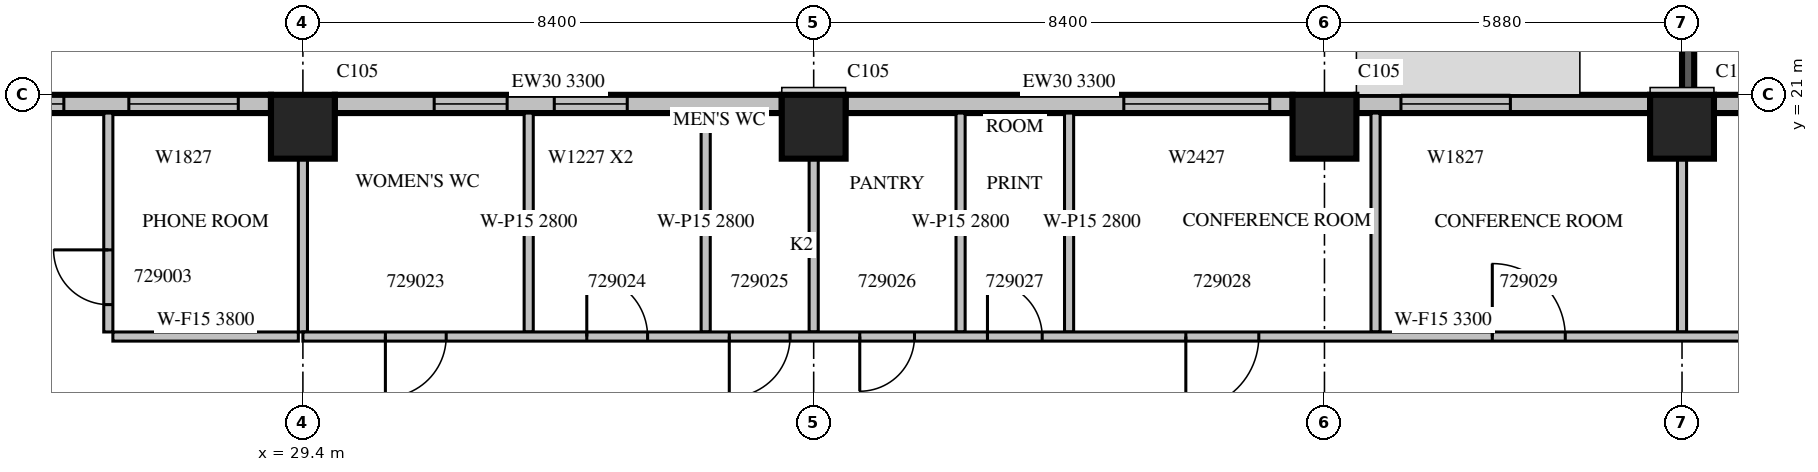
"""IFC4 building model, lengths in metres.
Left out: names, types, materials, properties, quantities, classifications, styles, units other than length and angle.
Written with IfcOpenShell. Run it as: python <this file> out.ifc"""

import sys

from ifc_helpers import new_model, si_unit, direction, frame, frame_2d, origin, origin_2d, place, context, subcontext, project, spatial, rectangle, extrude, source, transform, mapped, element, fill, save


model = new_model("IFC4")
c1 = context("Model", 3, precision=1e-05, world=origin(), true_north=direction((0.0, 1.0)))
c2 = subcontext(c1, "Body", "Model", "MODEL_VIEW")
j1 = project(units=[si_unit("LENGTHUNIT", "METRE"), si_unit("PLANEANGLEUNIT", "RADIAN")], contexts=[c1])
p1 = place(None, origin())
s1 = spatial("IfcSite", under=j1, at=p1, CompositionType="ELEMENT")
p2 = place(p1, origin())
s2 = spatial("IfcBuilding", under=s1, at=p2, CompositionType="ELEMENT")
p3 = place(p2, frame((0.0, 0.0, 132.9)))
s3 = spatial("IfcBuildingStorey", under=s2, at=p3, CompositionType="ELEMENT", Elevation=132.9)
m1 = source(origin(), c2, "Body", "SweptSolid", [
    extrude(rectangle(XDim=1.05, YDim=1.05, at=origin_2d()), origin(), (0.0, 0.0, 1.0), 4.2),
])
for number, where, z_axis, x_axis in (
    (1, (29.4, 20.475, 0.0), (0.0, 0.0, 1.0), (1.0, 0.0, 0.0)),
    (2, (37.8, 20.475, 0.0), (0.0, 0.0, 1.0), (1.0, 0.0, 0.0)),
    (3, (46.2, 20.475, 0.0), (0.0, 0.0, 1.0), (1.0, 0.0, 0.0)),
    (4, (52.08, 20.475, 0.0), (0.0, 0.0, 1.0), (1.0, 0.0, 0.0)),
):
    element("IfcColumn", number, at=place(p3, frame(where, z_axis=z_axis, x_axis=x_axis)), inside=s3, PredefinedType="COLUMN", context=c2, shape_type="MappedRepresentation", body=[
        mapped(m1, transform((0.0, 0.0, 0.0), scale=1.0)),
    ])
m2 = source(origin(), c2, "Body", "SweptSolid", [
    extrude(rectangle(XDim=3.9, YDim=0.2, at=frame_2d((1.95, 0.0))), origin(), (0.0, 0.0, 1.0), 3.79),
])
p4 = place(p3, frame((52.18, 21.0, 0.0), z_axis=(0.0, 0.0, 1.0), x_axis=(0.0, 1.0, 0.0)))
e5 = element("IfcWall", 5, at=p4, inside=s3, PredefinedType="SOLIDWALL", context=c2, shape_type="MappedRepresentation", body=[
    mapped(m2, transform((0.0, 0.0, 0.0), scale=1.0)),
])
m3 = source(origin(), c2, "Body", "SweptSolid", [
    extrude(rectangle(XDim=2.4, YDim=2.7, at=frame_2d((1.2, 1.35))), frame((0.0, 0.11, 0.0), z_axis=(0.0, -1.0, 0.0), x_axis=(1.0, 0.0, 0.0)), (0.0, 0.0, 1.0), 0.22),
])
p5 = place(p4, frame((0.75, 0.0, 0.6)))
e6 = element("IfcOpeningElement", 6, at=p5, cuts=e5, PredefinedType="OPENING", context=c2, shape_type="MappedRepresentation", body=[
    mapped(m3, transform((0.0, 0.0, 0.0), scale=1.0)),
])
m4 = source(origin(), c2, "Body", "SweptSolid", [
    extrude(rectangle(XDim=4.83, YDim=0.3, at=frame_2d((2.415, 0.0))), origin(), (0.0, 0.0, 1.0), 3.8),
])
p6 = place(p3, frame((57.435, 20.85, 0.0), z_axis=(0.0, 0.0, 1.0), x_axis=(-1.0, 0.0, 0.0)))
e7 = element("IfcWall", 7, at=p6, inside=s3, PredefinedType="STANDARD", context=c2, shape_type="MappedRepresentation", body=[
    mapped(m4, transform((0.0, 0.0, 0.0), scale=1.0)),
])
m5 = source(origin(), c2, "Body", "SweptSolid", [
    extrude(rectangle(XDim=1.0, YDim=2.1, at=frame_2d((0.5, 1.05))), frame((0.0, 0.16, 0.0), z_axis=(0.0, -1.0, 0.0), x_axis=(1.0, 0.0, 0.0)), (0.0, 0.0, 1.0), 0.32),
])
p7 = place(p6, frame((1.962, 0.0, 0.0)))
e8 = element("IfcOpeningElement", 8, at=p7, cuts=e7, PredefinedType="OPENING", context=c2, shape_type="MappedRepresentation", body=[
    mapped(m5, transform((0.0, 0.0, 0.0), scale=1.0)),
])
p8 = place(p3, frame((51.555, 20.85, 0.0), z_axis=(0.0, 0.0, 1.0), x_axis=(-1.0, 0.0, 0.0)))
e9 = element("IfcWall", 9, at=p8, inside=s3, PredefinedType="STANDARD", context=c2, shape_type="MappedRepresentation", body=[
    mapped(m4, transform((0.0, 0.0, 0.0), scale=1.0)),
])
m6 = source(origin(), c2, "Body", "SweptSolid", [
    extrude(rectangle(XDim=1.8, YDim=2.7, at=frame_2d((0.9, 1.35))), frame((0.0, 0.16, 0.0), z_axis=(0.0, -1.0, 0.0), x_axis=(1.0, 0.0, 0.0)), (0.0, 0.0, 1.0), 0.32),
])
p9 = place(p8, frame((2.297, 0.0, 0.6)))
e10 = element("IfcOpeningElement", 10, at=p9, cuts=e9, PredefinedType="OPENING", context=c2, shape_type="MappedRepresentation", body=[
    mapped(m6, transform((0.0, 0.0, 0.0), scale=1.0)),
])
m7 = source(origin(), c2, "Body", "SweptSolid", [
    extrude(rectangle(XDim=7.35, YDim=0.3, at=frame_2d((3.675, 0.0))), origin(), (0.0, 0.0, 1.0), 3.3),
])
p10 = place(p3, frame((45.675, 20.85, 0.0), z_axis=(0.0, 0.0, 1.0), x_axis=(-1.0, 0.0, 0.0)))
e11 = element("IfcWall", 11, at=p10, inside=s3, PredefinedType="STANDARD", context=c2, shape_type="MappedRepresentation", body=[
    mapped(m7, transform((0.0, 0.0, 0.0), scale=1.0)),
])
m8 = source(origin(), c2, "Body", "SweptSolid", [
    extrude(rectangle(XDim=2.4, YDim=2.7, at=frame_2d((1.2, 1.35))), frame((0.0, 0.16, 0.0), z_axis=(0.0, -1.0, 0.0), x_axis=(1.0, 0.0, 0.0)), (0.0, 0.0, 1.0), 0.32),
])
p11 = place(p10, frame((0.375, 0.0, 0.6)))
e12 = element("IfcOpeningElement", 12, at=p11, cuts=e11, PredefinedType="OPENING", context=c2, shape_type="MappedRepresentation", body=[
    mapped(m8, transform((0.0, 0.0, 0.0), scale=1.0)),
])
p12 = place(p3, frame((37.275, 20.85, 0.0), z_axis=(0.0, 0.0, 1.0), x_axis=(-1.0, 0.0, 0.0)))
e13 = element("IfcWall", 13, at=p12, inside=s3, PredefinedType="STANDARD", context=c2, shape_type="MappedRepresentation", body=[
    mapped(m7, transform((0.0, 0.0, 0.0), scale=1.0)),
])
m9 = source(origin(), c2, "Body", "SweptSolid", [
    extrude(rectangle(XDim=1.2, YDim=2.7, at=frame_2d((0.6, 1.35))), frame((0.0, 0.16, 0.0), z_axis=(0.0, -1.0, 0.0), x_axis=(1.0, 0.0, 0.0)), (0.0, 0.0, 1.0), 0.32),
])
p13 = place(p12, frame((2.541, 0.0, 0.6)))
e14 = element("IfcOpeningElement", 14, at=p13, cuts=e13, PredefinedType="OPENING", context=c2, shape_type="MappedRepresentation", body=[
    mapped(m9, transform((0.0, 0.0, 0.0), scale=1.0)),
])
p14 = place(p12, frame((4.516, 0.0, 0.6)))
e15 = element("IfcOpeningElement", 15, at=p14, cuts=e13, PredefinedType="OPENING", context=c2, shape_type="MappedRepresentation", body=[
    mapped(m9, transform((0.0, 0.0, 0.0), scale=1.0)),
])
m10 = source(origin(), c2, "Body", "SweptSolid", [
    extrude(rectangle(XDim=6.875, YDim=0.3, at=frame_2d((3.438, 0.0))), origin(), (0.0, 0.0, 1.0), 3.8),
])
p15 = place(p3, frame((28.875, 20.85, 0.0), z_axis=(0.0, 0.0, 1.0), x_axis=(-1.0, 0.0, 0.0)))
e16 = element("IfcWall", 16, at=p15, inside=s3, PredefinedType="STANDARD", context=c2, shape_type="MappedRepresentation", body=[
    mapped(m10, transform((0.0, 0.0, 0.0), scale=1.0)),
])
p16 = place(p15, frame((0.537, 0.0, 0.6)))
e17 = element("IfcOpeningElement", 17, at=p16, cuts=e16, PredefinedType="OPENING", context=c2, shape_type="MappedRepresentation", body=[
    mapped(m6, transform((0.0, 0.0, 0.0), scale=1.0)),
])
p17 = place(p15, frame((3.406, 0.0, 0.6)))
e18 = element("IfcOpeningElement", 18, at=p17, cuts=e16, PredefinedType="OPENING", context=c2, shape_type="MappedRepresentation", body=[
    mapped(m8, transform((0.0, 0.0, 0.0), scale=1.0)),
])
m11 = source(origin(), c2, "Body", "SweptSolid", [
    extrude(rectangle(XDim=3.6, YDim=0.15, at=frame_2d((1.8, 0.0))), origin(), (0.0, 0.0, 1.0), 3.8),
])
p18 = place(p3, frame((26.2, 20.7, 0.0), z_axis=(0.0, 0.0, 1.0), x_axis=(0.0, -1.0, 0.0)))
e19 = element("IfcWall", 19, at=p18, inside=s3, PredefinedType="PARTITIONING", context=c2, shape_type="MappedRepresentation", body=[
    mapped(m11, transform((0.0, 0.0, 0.0), scale=1.0)),
])
m12 = source(origin(), c2, "Body", "SweptSolid", [
    extrude(rectangle(XDim=0.9, YDim=2.1, at=frame_2d((0.45, 1.05))), frame((0.0, 0.085, 0.0), z_axis=(0.0, -1.0, 0.0), x_axis=(1.0, 0.0, 0.0)), (0.0, 0.0, 1.0), 0.17),
])
p19 = place(p18, frame((2.25, 0.0, 0.0)))
e20 = element("IfcOpeningElement", 20, at=p19, cuts=e19, PredefinedType="OPENING", context=c2, shape_type="MappedRepresentation", body=[
    mapped(m12, transform((0.0, 0.0, 0.0), scale=1.0)),
])
m13 = source(origin(), c2, "Body", "SweptSolid", [
    extrude(rectangle(XDim=3.05, YDim=0.15, at=frame_2d((1.525, 0.0))), origin(), (0.0, 0.0, 1.0), 3.8),
])
p20 = place(p3, frame((26.275, 17.025, 0.0), z_axis=(0.0, 0.0, 1.0), x_axis=(1.0, 0.0, 0.0)))
e21 = element("IfcWall", 21, at=p20, inside=s3, PredefinedType="PARTITIONING", context=c2, shape_type="MappedRepresentation", body=[
    mapped(m13, transform((0.0, 0.0, 0.0), scale=1.0)),
])
m14 = source(origin(), c2, "Body", "SweptSolid", [
    extrude(rectangle(XDim=2.851, YDim=0.15, at=frame_2d((1.425, 0.0))), origin(), (0.0, 0.0, 1.0), 3.8),
])
p21 = place(p3, frame((29.4, 17.1, 0.0), z_axis=(0.0, 0.0, 1.0), x_axis=(0.0, 1.0, 0.0)))
e22 = element("IfcWall", 22, at=p21, inside=s3, PredefinedType="PARTITIONING", context=c2, shape_type="MappedRepresentation", body=[
    mapped(m14, transform((0.0, 0.0, 0.0), scale=1.0)),
])
m15 = source(origin(), c2, "Body", "SweptSolid", [
    extrude(rectangle(XDim=3.6, YDim=0.15, at=frame_2d((1.8, 0.0))), origin(), (0.0, 0.0, 1.0), 2.8),
])
for number, where, z_axis, x_axis in (
    (23, (33.113, 20.7, 0.0), (0.0, 0.0, 1.0), (0.0, -1.0, 0.0)),
    (24, (36.024, 20.7, 0.0), (0.0, 0.0, 1.0), (0.0, -1.0, 0.0)),
    (25, (40.216, 20.7, 0.0), (0.0, 0.0, 1.0), (0.0, -1.0, 0.0)),
):
    element("IfcWall", number, at=place(p3, frame(where, z_axis=z_axis, x_axis=x_axis)), inside=s3, PredefinedType="PARTITIONING", context=c2, shape_type="MappedRepresentation", body=[
        mapped(m15, transform((0.0, 0.0, 0.0), scale=1.0)),
    ])
p22 = place(p3, frame((47.04, 20.7, 0.0), z_axis=(0.0, 0.0, 1.0), x_axis=(0.0, -1.0, 0.0)))
e26 = element("IfcWall", 26, at=p22, inside=s3, PredefinedType="PARTITIONING", context=c2, shape_type="MappedRepresentation", body=[
    mapped(m11, transform((0.0, 0.0, 0.0), scale=1.0)),
])
p23 = place(p3, frame((37.8, 17.1, 0.0), z_axis=(0.0, 0.0, 1.0), x_axis=(0.0, 1.0, 0.0)))
e27 = element("IfcWall", 27, at=p23, inside=s3, PredefinedType="PARTITIONING", context=c2, shape_type="MappedRepresentation", body=[
    mapped(m14, transform((0.0, 0.0, 0.0), scale=1.0)),
])
p24 = place(p3, frame((42.0, 17.1, 0.0), z_axis=(0.0, 0.0, 1.0), x_axis=(0.0, 1.0, 0.0)))
e28 = element("IfcWall", 28, at=p24, inside=s3, PredefinedType="PARTITIONING", context=c2, shape_type="MappedRepresentation", body=[
    mapped(m15, transform((0.0, 0.0, 0.0), scale=1.0)),
])
p25 = place(p3, frame((52.08, 17.1, 0.0), z_axis=(0.0, 0.0, 1.0), x_axis=(0.0, 1.0, 0.0)))
e29 = element("IfcWall", 29, at=p25, inside=s3, PredefinedType="PARTITIONING", context=c2, shape_type="MappedRepresentation", body=[
    mapped(m14, transform((0.0, 0.0, 0.0), scale=1.0)),
])
m16 = source(origin(), c2, "Body", "SweptSolid", [
    extrude(rectangle(XDim=37.5, YDim=0.15, at=frame_2d((18.75, 0.0))), origin(), (0.0, 0.0, 1.0), 3.3),
])
p26 = place(p3, frame((29.4, 17.025, 0.0), z_axis=(0.0, 0.0, 1.0), x_axis=(1.0, 0.0, 0.0)))
e30 = element("IfcWall", 30, at=p26, inside=s3, PredefinedType="PARTITIONING", context=c2, shape_type="MappedRepresentation", body=[
    mapped(m16, transform((0.0, 0.0, 0.0), scale=1.0)),
])
m17 = source(origin(), c2, "Body", "SweptSolid", [
    extrude(rectangle(XDim=1.0, YDim=2.1, at=frame_2d((0.5, 1.05))), frame((0.0, 0.085, 0.0), z_axis=(0.0, -1.0, 0.0), x_axis=(1.0, 0.0, 0.0)), (0.0, 0.0, 1.0), 0.17),
])
p27 = place(p26, frame((1.357, 0.0, 0.0)))
e31 = element("IfcOpeningElement", 31, at=p27, cuts=e30, PredefinedType="OPENING", context=c2, shape_type="MappedRepresentation", body=[
    mapped(m17, transform((0.0, 0.0, 0.0), scale=1.0)),
])
p28 = place(p26, frame((4.669, 0.0, 0.0)))
e32 = element("IfcOpeningElement", 32, at=p28, cuts=e30, PredefinedType="OPENING", context=c2, shape_type="MappedRepresentation", body=[
    mapped(m17, transform((0.0, 0.0, 0.0), scale=1.0)),
])
p29 = place(p26, frame((7.012, 0.0, 0.0)))
e33 = element("IfcOpeningElement", 33, at=p29, cuts=e30, PredefinedType="OPENING", context=c2, shape_type="MappedRepresentation", body=[
    mapped(m17, transform((0.0, 0.0, 0.0), scale=1.0)),
])
p30 = place(p26, frame((9.158, 0.0, 0.0)))
e34 = element("IfcOpeningElement", 34, at=p30, cuts=e30, PredefinedType="OPENING", context=c2, shape_type="MappedRepresentation", body=[
    mapped(m12, transform((0.0, 0.0, 0.0), scale=1.0)),
])
p31 = place(p26, frame((11.258, 0.0, 0.0)))
e35 = element("IfcOpeningElement", 35, at=p31, cuts=e30, PredefinedType="OPENING", context=c2, shape_type="MappedRepresentation", body=[
    mapped(m12, transform((0.0, 0.0, 0.0), scale=1.0)),
])
m18 = source(origin(), c2, "Body", "SweptSolid", [
    extrude(rectangle(XDim=1.2, YDim=2.1, at=frame_2d((0.6, 1.05))), frame((0.0, 0.085, 0.0), z_axis=(0.0, -1.0, 0.0), x_axis=(1.0, 0.0, 0.0)), (0.0, 0.0, 1.0), 0.17),
])
p32 = place(p26, frame((14.52, 0.0, 0.0)))
e36 = element("IfcOpeningElement", 36, at=p32, cuts=e30, PredefinedType="OPENING", context=c2, shape_type="MappedRepresentation", body=[
    mapped(m18, transform((0.0, 0.0, 0.0), scale=1.0)),
])
p33 = place(p26, frame((19.56, 0.0, 0.0)))
e37 = element("IfcOpeningElement", 37, at=p33, cuts=e30, PredefinedType="OPENING", context=c2, shape_type="MappedRepresentation", body=[
    mapped(m18, transform((0.0, 0.0, 0.0), scale=1.0)),
])
p34 = place(p26, frame((25.804, 0.0, 0.0)))
e38 = element("IfcOpeningElement", 38, at=p34, cuts=e30, PredefinedType="OPENING", context=c2, shape_type="MappedRepresentation", body=[
    mapped(m18, transform((0.0, 0.0, 0.0), scale=1.0)),
])
p35 = place(p26, frame((33.251, 0.0, 0.0)))
e39 = element("IfcOpeningElement", 39, at=p35, cuts=e30, PredefinedType="OPENING", context=c2, shape_type="MappedRepresentation", body=[
    mapped(m18, transform((0.0, 0.0, 0.0), scale=1.0)),
])
m19 = source(origin(), c2, "Body", "SweptSolid", [
    extrude(rectangle(XDim=1.8, YDim=2.7, at=frame_2d((0.9, 1.35))), frame((0.0, 0.03, 0.0), z_axis=(0.0, -1.0, 0.0), x_axis=(1.0, 0.0, 0.0)), (0.0, 0.0, 1.0), 0.06),
])
p36 = place(p9, origin())
e40 = element("IfcWindow", 40, at=p36, inside=s3, PartitioningType="SINGLE_PANEL", PredefinedType="WINDOW", context=c2, shape_type="MappedRepresentation", body=[
    mapped(m19, transform((0.0, 0.0, 0.0), scale=1.0)),
])
fill(e10, e40)
m20 = source(origin(), c2, "Body", "SweptSolid", [
    extrude(rectangle(XDim=2.4, YDim=2.7, at=frame_2d((1.2, 1.35))), frame((0.0, 0.03, 0.0), z_axis=(0.0, -1.0, 0.0), x_axis=(1.0, 0.0, 0.0)), (0.0, 0.0, 1.0), 0.06),
])
p37 = place(p11, origin())
e41 = element("IfcWindow", 41, at=p37, inside=s3, PartitioningType="SINGLE_PANEL", PredefinedType="WINDOW", context=c2, shape_type="MappedRepresentation", body=[
    mapped(m20, transform((0.0, 0.0, 0.0), scale=1.0)),
])
fill(e12, e41)
m21 = source(origin(), c2, "Body", "SweptSolid", [
    extrude(rectangle(XDim=1.2, YDim=2.7, at=frame_2d((0.6, 1.35))), frame((0.0, 0.03, 0.0), z_axis=(0.0, -1.0, 0.0), x_axis=(1.0, 0.0, 0.0)), (0.0, 0.0, 1.0), 0.06),
])
p38 = place(p13, origin())
e42 = element("IfcWindow", 42, at=p38, inside=s3, PartitioningType="SINGLE_PANEL", PredefinedType="WINDOW", context=c2, shape_type="MappedRepresentation", body=[
    mapped(m21, transform((0.0, 0.0, 0.0), scale=1.0)),
])
fill(e14, e42)
p39 = place(p14, origin())
e43 = element("IfcWindow", 43, at=p39, inside=s3, PartitioningType="SINGLE_PANEL", PredefinedType="WINDOW", context=c2, shape_type="MappedRepresentation", body=[
    mapped(m21, transform((0.0, 0.0, 0.0), scale=1.0)),
])
fill(e15, e43)
p40 = place(p16, origin())
e44 = element("IfcWindow", 44, at=p40, inside=s3, PartitioningType="SINGLE_PANEL", PredefinedType="WINDOW", context=c2, shape_type="MappedRepresentation", body=[
    mapped(m19, transform((0.0, 0.0, 0.0), scale=1.0)),
])
fill(e17, e44)
p41 = place(p17, origin())
e45 = element("IfcWindow", 45, at=p41, inside=s3, PartitioningType="SINGLE_PANEL", PredefinedType="WINDOW", context=c2, shape_type="MappedRepresentation", body=[
    mapped(m20, transform((0.0, 0.0, 0.0), scale=1.0)),
])
fill(e18, e45)
m22 = source(origin(), c2, "Body", "SweptSolid", [
    extrude(rectangle(XDim=0.9, YDim=2.1, at=frame_2d((0.45, 1.05))), frame((0.0, 0.025, 0.0), z_axis=(0.0, -1.0, 0.0), x_axis=(1.0, 0.0, 0.0)), (0.0, 0.0, 1.0), 0.05),
])
p42 = place(p19, origin())
e46 = element("IfcDoor", 46, at=p42, inside=s3, OperationType="SINGLE_SWING_RIGHT", PredefinedType="DOOR", context=c2, shape_type="MappedRepresentation", body=[
    mapped(m22, transform((0.0, 0.0, 0.0), scale=1.0)),
])
fill(e20, e46)
m23 = source(origin(), c2, "Body", "SweptSolid", [
    extrude(rectangle(XDim=1.0, YDim=2.1, at=frame_2d((0.5, 1.05))), frame((0.0, 0.025, 0.0), z_axis=(0.0, -1.0, 0.0), x_axis=(1.0, 0.0, 0.0)), (0.0, 0.0, 1.0), 0.05),
])
p43 = place(p27, origin())
e47 = element("IfcDoor", 47, at=p43, inside=s3, OperationType="SINGLE_SWING_RIGHT", PredefinedType="DOOR", context=c2, shape_type="MappedRepresentation", body=[
    mapped(m23, transform((0.0, 0.0, 0.0), scale=1.0)),
])
fill(e31, e47)
p44 = place(p28, origin())
e48 = element("IfcDoor", 48, at=p44, inside=s3, OperationType="SINGLE_SWING_LEFT", PredefinedType="DOOR", context=c2, shape_type="MappedRepresentation", body=[
    mapped(m23, transform((0.0, 0.0, 0.0), scale=1.0)),
])
fill(e32, e48)
p45 = place(p29, origin())
e49 = element("IfcDoor", 49, at=p45, inside=s3, OperationType="SINGLE_SWING_RIGHT", PredefinedType="DOOR", context=c2, shape_type="MappedRepresentation", body=[
    mapped(m23, transform((0.0, 0.0, 0.0), scale=1.0)),
])
fill(e33, e49)
p46 = place(p30, origin())
e50 = element("IfcDoor", 50, at=p46, inside=s3, OperationType="SINGLE_SWING_RIGHT", PredefinedType="DOOR", context=c2, shape_type="MappedRepresentation", body=[
    mapped(m22, transform((0.0, 0.0, 0.0), scale=1.0)),
])
fill(e34, e50)
p47 = place(p31, origin())
e51 = element("IfcDoor", 51, at=p47, inside=s3, OperationType="SINGLE_SWING_LEFT", PredefinedType="DOOR", context=c2, shape_type="MappedRepresentation", body=[
    mapped(m22, transform((0.0, 0.0, 0.0), scale=1.0)),
])
fill(e35, e51)
m24 = source(origin(), c2, "Body", "SweptSolid", [
    extrude(rectangle(XDim=1.2, YDim=2.1, at=frame_2d((0.6, 1.05))), frame((0.0, 0.025, 0.0), z_axis=(0.0, -1.0, 0.0), x_axis=(1.0, 0.0, 0.0)), (0.0, 0.0, 1.0), 0.05),
])
p48 = place(p32, origin())
e52 = element("IfcDoor", 52, at=p48, inside=s3, OperationType="SINGLE_SWING_RIGHT", PredefinedType="DOOR", context=c2, shape_type="MappedRepresentation", body=[
    mapped(m24, transform((0.0, 0.0, 0.0), scale=1.0)),
])
fill(e36, e52)
p49 = place(p33, origin())
e53 = element("IfcDoor", 53, at=p49, inside=s3, OperationType="SINGLE_SWING_LEFT", PredefinedType="DOOR", context=c2, shape_type="MappedRepresentation", body=[
    mapped(m24, transform((0.0, 0.0, 0.0), scale=1.0)),
])
fill(e37, e53)
save(model, sys.argv[1])
